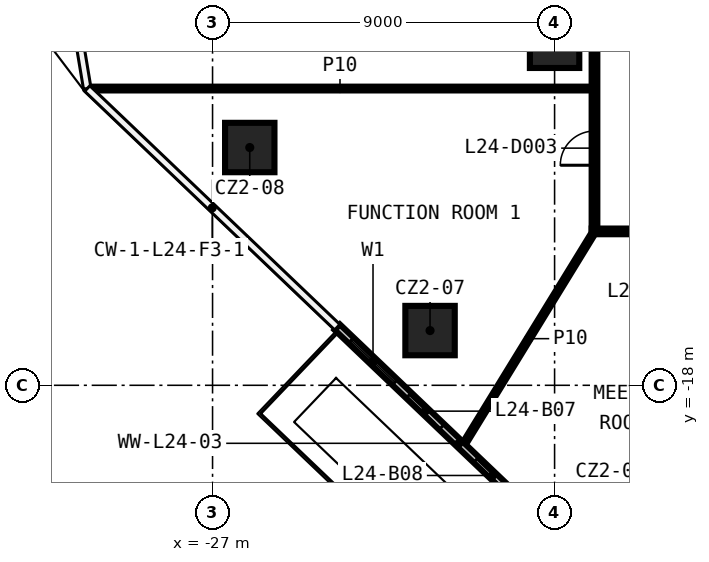
"""IFC4 building model, lengths in metres.
Left out: names, types, materials, properties, quantities, classifications, styles, units other than length and angle.
Written with IfcOpenShell. Run it as: python <this file> out.ifc"""

import sys

from ifc_helpers import new_model, si_unit, direction, frame, frame_2d, origin, origin_2d, place, context, subcontext, project, spatial, rectangle, extrude, element, fill, save


model = new_model("IFC4")
c1 = context("Model", 3, precision=1e-05, world=origin(), true_north=direction((0.0, 1.0)))
c2 = subcontext(c1, "Body", "Model", "MODEL_VIEW")
j1 = project(units=[si_unit("LENGTHUNIT", "METRE"), si_unit("PLANEANGLEUNIT", "RADIAN")], contexts=[c1])
p1 = place(None, origin())
s1 = spatial("IfcSite", under=j1, at=p1, CompositionType="ELEMENT")
p2 = place(p1, origin())
s2 = spatial("IfcBuilding", under=s1, at=p2, CompositionType="ELEMENT")
p3 = place(p2, frame((0.0, 0.0, 113.7)))
s3 = spatial("IfcBuildingStorey", under=s2, at=p3, CompositionType="ELEMENT", Elevation=113.7)
for number, where, z_axis, x_axis in (
    (1, (-21.277, -16.56, 0.0), (0.0, 0.0, 1.0), (1.0, 0.0, 0.0)),
    (2, (-26.021, -11.743, 0.0), (0.0, 0.0, 1.0), (1.0, 0.0, 0.0)),
    (3, (-18.0, -9.0, 0.0), (0.0, 0.0, 1.0), (1.0, 0.0, 0.0)),
):
    element("IfcColumn", number, at=place(p3, frame(where, z_axis=z_axis, x_axis=x_axis)), inside=s3, PredefinedType="COLUMN", context=c2, shape_type="SweptSolid", body=[
        extrude(rectangle(XDim=1.3, YDim=1.3, at=origin_2d()), origin(), (0.0, 0.0, 1.0), 3.3),
    ])
p4 = place(p3, frame((17.025, -13.95, 0.0), z_axis=(0.0, 0.0, 1.0), x_axis=(-1.0, 0.0, 0.0)))
e4 = element("IfcWall", 4, at=p4, inside=s3, PredefinedType="PARTITIONING", context=c2, shape_type="SweptSolid", body=[
    extrude(rectangle(XDim=34.05, YDim=0.15, at=frame_2d((17.025, 0.0))), origin(), (0.0, 0.0, 1.0), 3.3),
])
p5 = place(p4, frame((31.974, 0.0, 0.0)))
e5 = element("IfcOpeningElement", 5, at=p5, cuts=e4, PredefinedType="OPENING", context=c2, shape_type="SweptSolid", body=[
    extrude(rectangle(XDim=0.9, YDim=2.1, at=frame_2d((0.45, 1.05))), frame((0.0, 0.085, 0.0), z_axis=(0.0, -1.0, 0.0), x_axis=(1.0, 0.0, 0.0)), (0.0, 0.0, 1.0), 0.17),
])
p6 = place(p4, frame((27.543, 0.0, 0.0)))
e6 = element("IfcOpeningElement", 6, at=p6, cuts=e4, PredefinedType="OPENING", context=c2, shape_type="SweptSolid", body=[
    extrude(rectangle(XDim=1.0, YDim=2.1, at=frame_2d((0.5, 1.05))), frame((0.0, 0.085, 0.0), z_axis=(0.0, -1.0, 0.0), x_axis=(1.0, 0.0, 0.0)), (0.0, 0.0, 1.0), 0.17),
])
p7 = place(p4, frame((16.333, 0.0, 0.0)))
e7 = element("IfcOpeningElement", 7, at=p7, cuts=e4, PredefinedType="OPENING", context=c2, shape_type="SweptSolid", body=[
    extrude(rectangle(XDim=1.0, YDim=2.1, at=frame_2d((0.5, 1.05))), frame((0.0, 0.085, 0.0), z_axis=(0.0, -1.0, 0.0), x_axis=(1.0, 0.0, 0.0)), (0.0, 0.0, 1.0), 0.17),
])
p8 = place(p4, frame((12.006, 0.0, 0.0)))
e8 = element("IfcOpeningElement", 8, at=p8, cuts=e4, PredefinedType="OPENING", context=c2, shape_type="SweptSolid", body=[
    extrude(rectangle(XDim=1.0, YDim=2.1, at=frame_2d((0.5, 1.05))), frame((0.0, 0.085, 0.0), z_axis=(0.0, -1.0, 0.0), x_axis=(1.0, 0.0, 0.0)), (0.0, 0.0, 1.0), 0.17),
])
p9 = place(p4, frame((5.124, 0.0, 0.0)))
e9 = element("IfcOpeningElement", 9, at=p9, cuts=e4, PredefinedType="OPENING", context=c2, shape_type="SweptSolid", body=[
    extrude(rectangle(XDim=1.0, YDim=2.1, at=frame_2d((0.5, 1.05))), frame((0.0, 0.085, 0.0), z_axis=(0.0, -1.0, 0.0), x_axis=(1.0, 0.0, 0.0)), (0.0, 0.0, 1.0), 0.17),
])
p10 = place(p4, frame((3.144, 0.0, 0.0)))
e10 = element("IfcOpeningElement", 10, at=p10, cuts=e4, PredefinedType="OPENING", context=c2, shape_type="SweptSolid", body=[
    extrude(rectangle(XDim=1.0, YDim=2.1, at=frame_2d((0.5, 1.05))), frame((0.0, 0.085, 0.0), z_axis=(0.0, -1.0, 0.0), x_axis=(1.0, 0.0, 0.0)), (0.0, 0.0, 1.0), 0.17),
])
p11 = place(p3, frame((-30.268, -10.191, 0.0), z_axis=(0.0, 0.0, 1.0), x_axis=(1.0, 0.0, 0.0)))
e11 = element("IfcWall", 11, at=p11, inside=s3, PredefinedType="PARTITIONING", context=c2, shape_type="SweptSolid", body=[
    extrude(rectangle(XDim=13.243, YDim=0.1, at=frame_2d((6.622, 0.0))), origin(), (0.0, 0.0, 1.0), 3.3),
])
p12 = place(p3, frame((-20.415, -19.596, 0.0), z_axis=(0.0, 0.0, 1.0), x_axis=(0.5230874117, 0.85227903865, 0.0)))
e12 = element("IfcWall", 12, at=p12, inside=s3, PredefinedType="PARTITIONING", context=c2, shape_type="SweptSolid", body=[
    extrude(rectangle(XDim=6.624, YDim=0.1, at=frame_2d((3.312, 0.0))), origin(), (0.0, 0.0, 1.0), 3.3),
])
p13 = place(p3, frame((-16.95, -13.875, 0.0), z_axis=(0.0, 0.0, 1.0), x_axis=(0.0, 1.0, 0.0)))
e13 = element("IfcWall", 13, at=p13, inside=s3, PredefinedType="PARTITIONING", context=c2, shape_type="SweptSolid", body=[
    extrude(rectangle(XDim=27.75, YDim=0.15, at=frame_2d((13.875, 0.0))), origin(), (0.0, 0.0, 1.0), 3.3),
])
p14 = place(p13, frame((11.06, 0.0, 0.0)))
e14 = element("IfcOpeningElement", 14, at=p14, cuts=e13, PredefinedType="OPENING", context=c2, shape_type="SweptSolid", body=[
    extrude(rectangle(XDim=0.9, YDim=2.1, at=frame_2d((0.45, 1.05))), frame((0.0, 0.085, 0.0), z_axis=(0.0, -1.0, 0.0), x_axis=(1.0, 0.0, 0.0)), (0.0, 0.0, 1.0), 0.17),
])
p15 = place(p13, frame((8.387, 0.0, 0.0)))
e15 = element("IfcOpeningElement", 15, at=p15, cuts=e13, PredefinedType="OPENING", context=c2, shape_type="SweptSolid", body=[
    extrude(rectangle(XDim=0.9, YDim=2.1, at=frame_2d((0.45, 1.05))), frame((0.0, 0.085, 0.0), z_axis=(0.0, -1.0, 0.0), x_axis=(1.0, 0.0, 0.0)), (0.0, 0.0, 1.0), 0.17),
])
p16 = place(p13, frame((1.666, 0.0, 0.0)))
e16 = element("IfcOpeningElement", 16, at=p16, cuts=e13, PredefinedType="OPENING", context=c2, shape_type="SweptSolid", body=[
    extrude(rectangle(XDim=0.9, YDim=2.1, at=frame_2d((0.45, 1.05))), frame((0.0, 0.085, 0.0), z_axis=(0.0, -1.0, 0.0), x_axis=(1.0, 0.0, 0.0)), (0.0, 0.0, 1.0), 0.17),
])
p17 = place(p13, frame((25.152, 0.0, 0.0)))
e17 = element("IfcOpeningElement", 17, at=p17, cuts=e13, PredefinedType="OPENING", context=c2, shape_type="SweptSolid", body=[
    extrude(rectangle(XDim=0.9, YDim=2.1, at=frame_2d((0.45, 1.05))), frame((0.0, 0.085, 0.0), z_axis=(0.0, -1.0, 0.0), x_axis=(1.0, 0.0, 0.0)), (0.0, 0.0, 1.0), 0.17),
])
p18 = place(p13, frame((18.782, 0.0, 0.0)))
e18 = element("IfcOpeningElement", 18, at=p18, cuts=e13, PredefinedType="OPENING", context=c2, shape_type="SweptSolid", body=[
    extrude(rectangle(XDim=1.0, YDim=2.1, at=frame_2d((0.5, 1.05))), frame((0.0, 0.085, 0.0), z_axis=(0.0, -1.0, 0.0), x_axis=(1.0, 0.0, 0.0)), (0.0, 0.0, 1.0), 0.17),
])
p19 = place(p13, frame((17.26, 0.0, 0.0)))
e19 = element("IfcOpeningElement", 19, at=p19, cuts=e13, PredefinedType="OPENING", context=c2, shape_type="SweptSolid", body=[
    extrude(rectangle(XDim=1.0, YDim=2.1, at=frame_2d((0.5, 1.05))), frame((0.0, 0.085, 0.0), z_axis=(0.0, -1.0, 0.0), x_axis=(1.0, 0.0, 0.0)), (0.0, 0.0, 1.0), 0.17),
])
p20 = place(p3, frame((-23.718, -16.471, 0.0), z_axis=(0.0, 0.0, 1.0), x_axis=(0.723342757747, -0.690489141706, 0.0)))
e20 = element("IfcWall", 20, at=p20, inside=s3, PredefinedType="SOLIDWALL", context=c2, shape_type="SweptSolid", body=[
    extrude(rectangle(XDim=9.103, YDim=0.2, at=frame_2d((4.552, 0.0))), origin(), (0.0, 0.0, 1.0), 3.3),
])
p21 = place(p20, frame((0.5, 0.0, 0.6)))
e21 = element("IfcOpeningElement", 21, at=p21, cuts=e20, PredefinedType="OPENING", context=c2, shape_type="SweptSolid", body=[
    extrude(rectangle(XDim=1.6, YDim=2.4, at=frame_2d((0.8, 1.2))), frame((0.0, 0.11, 0.0), z_axis=(0.0, -1.0, 0.0), x_axis=(1.0, 0.0, 0.0)), (0.0, 0.0, 1.0), 0.22),
])
p22 = place(p20, frame((2.6, 0.0, 0.0)))
e22 = element("IfcOpeningElement", 22, at=p22, cuts=e20, PredefinedType="OPENING", context=c2, shape_type="SweptSolid", body=[
    extrude(rectangle(XDim=1.2, YDim=2.4, at=frame_2d((0.6, 1.2))), frame((0.0, 0.11, 0.0), z_axis=(0.0, -1.0, 0.0), x_axis=(1.0, 0.0, 0.0)), (0.0, 0.0, 1.0), 0.22),
])
p23 = place(p20, frame((6.552, 0.0, 0.6)))
e23 = element("IfcOpeningElement", 23, at=p23, cuts=e20, PredefinedType="OPENING", context=c2, shape_type="SweptSolid", body=[
    extrude(rectangle(XDim=1.6, YDim=2.4, at=frame_2d((0.8, 1.2))), frame((0.0, 0.11, 0.0), z_axis=(0.0, -1.0, 0.0), x_axis=(1.0, 0.0, 0.0)), (0.0, 0.0, 1.0), 0.22),
])
p24 = place(p20, frame((5.052, 0.0, 0.0)))
e24 = element("IfcOpeningElement", 24, at=p24, cuts=e20, PredefinedType="OPENING", context=c2, shape_type="SweptSolid", body=[
    extrude(rectangle(XDim=1.2, YDim=2.4, at=frame_2d((0.6, 1.2))), frame((0.0, 0.11, 0.0), z_axis=(0.0, -1.0, 0.0), x_axis=(1.0, 0.0, 0.0)), (0.0, 0.0, 1.0), 0.22),
])
p25 = place(p16, origin())
e25 = element("IfcDoor", 25, at=p25, inside=s3, OperationType="SINGLE_SWING_LEFT", PredefinedType="DOOR", context=c2, shape_type="SweptSolid", body=[
    extrude(rectangle(XDim=0.9, YDim=2.1, at=frame_2d((0.45, 1.05))), frame((0.0, 0.025, 0.0), z_axis=(0.0, -1.0, 0.0), x_axis=(1.0, 0.0, 0.0)), (0.0, 0.0, 1.0), 0.05),
])
fill(e16, e25)
p26 = place(p21, origin())
e26 = element("IfcWindow", 26, at=p26, inside=s3, PartitioningType="SINGLE_PANEL", PredefinedType="WINDOW", context=c2, shape_type="SweptSolid", body=[
    extrude(rectangle(XDim=1.6, YDim=2.4, at=frame_2d((0.8, 1.2))), frame((0.0, 0.03, 0.0), z_axis=(0.0, -1.0, 0.0), x_axis=(1.0, 0.0, 0.0)), (0.0, 0.0, 1.0), 0.06),
])
fill(e21, e26)
p27 = place(p22, origin())
e27 = element("IfcDoor", 27, at=p27, inside=s3, OperationType="SLIDING_TO_LEFT", PredefinedType="DOOR", context=c2, shape_type="SweptSolid", body=[
    extrude(rectangle(XDim=1.2, YDim=2.4, at=frame_2d((0.6, 1.2))), frame((0.0, 0.025, 0.0), z_axis=(0.0, -1.0, 0.0), x_axis=(1.0, 0.0, 0.0)), (0.0, 0.0, 1.0), 0.05),
])
fill(e22, e27)
p28 = place(p24, origin())
e28 = element("IfcDoor", 28, at=p28, inside=s3, OperationType="SLIDING_TO_LEFT", PredefinedType="DOOR", context=c2, shape_type="SweptSolid", body=[
    extrude(rectangle(XDim=1.2, YDim=2.4, at=frame_2d((0.6, 1.2))), frame((0.0, 0.025, 0.0), z_axis=(0.0, -1.0, 0.0), x_axis=(1.0, 0.0, 0.0)), (0.0, 0.0, 1.0), 0.05),
])
fill(e24, e28)
save(model, sys.argv[1])
